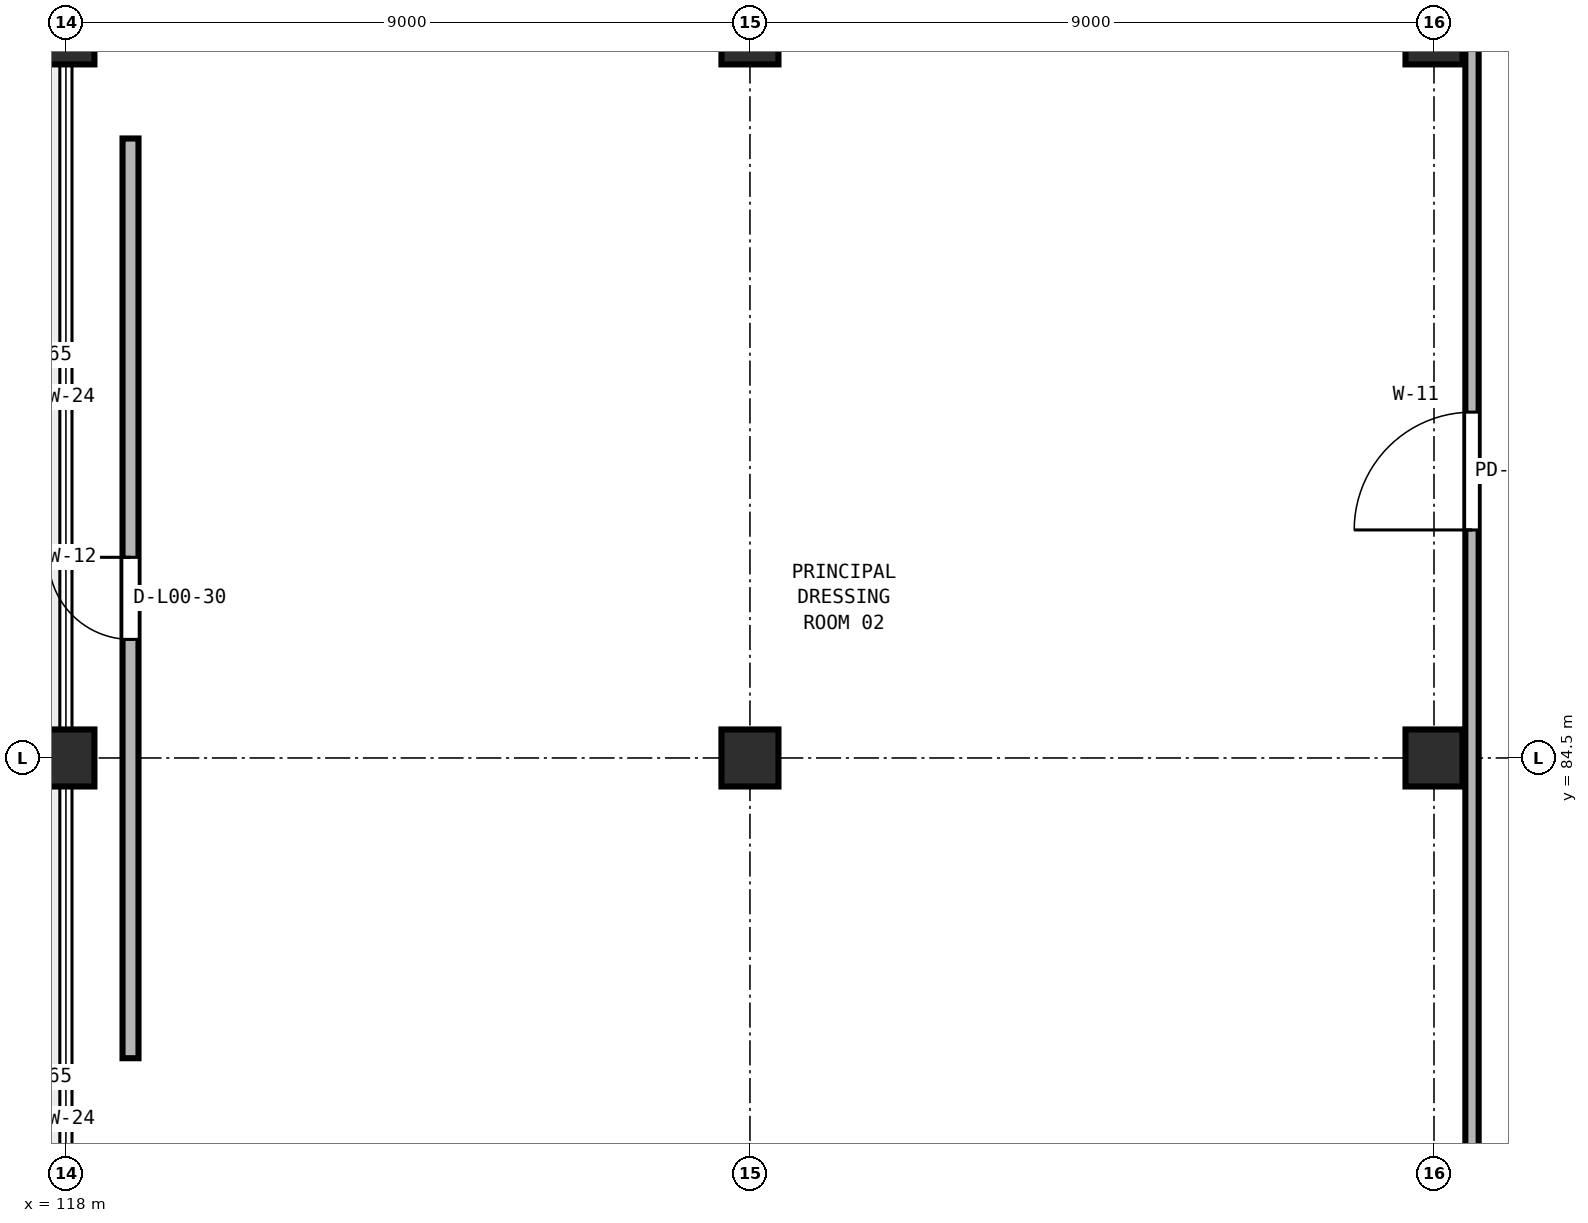
"""IFC4 building model, lengths in metres.
Left out: names, types, materials, properties, quantities, classifications, styles, units other than length and angle.
Written with IfcOpenShell. Run it as: python <this file> out.ifc"""

import sys

from ifc_helpers import new_model, si_unit, direction, frame, frame_2d, origin, origin_2d, place, context, subcontext, project, spatial, rectangle, extrude, element, fill, save


model = new_model("IFC4")
c1 = context("Model", 3, precision=1e-05, world=origin(), true_north=direction((0.0, 1.0)))
c2 = subcontext(c1, "Body", "Model", "MODEL_VIEW")
j1 = project(units=[si_unit("LENGTHUNIT", "METRE"), si_unit("PLANEANGLEUNIT", "RADIAN")], contexts=[c1])
p1 = place(None, origin())
s1 = spatial("IfcSite", under=j1, at=p1, CompositionType="ELEMENT")
p2 = place(p1, origin())
s2 = spatial("IfcBuilding", under=s1, at=p2, CompositionType="ELEMENT")
p3 = place(p2, origin())
s3 = spatial("IfcBuildingStorey", under=s2, at=p3, CompositionType="ELEMENT", Elevation=0.0)
for number, where, z_axis, x_axis in (
    (1, (118.0, 84.5, 0.0), (0.0, 0.0, 1.0), (1.0, 0.0, 0.0)),
    (2, (118.0, 94.0, 0.0), (0.0, 0.0, 1.0), (1.0, 0.0, 0.0)),
    (3, (127.0, 84.5, 0.0), (0.0, 0.0, 1.0), (1.0, 0.0, 0.0)),
    (4, (127.0, 94.0, 0.0), (0.0, 0.0, 1.0), (1.0, 0.0, 0.0)),
    (5, (136.0, 84.5, 0.0), (0.0, 0.0, 1.0), (1.0, 0.0, 0.0)),
    (6, (136.0, 94.0, 0.0), (0.0, 0.0, 1.0), (1.0, 0.0, 0.0)),
):
    element("IfcColumn", number, at=place(p3, frame(where, z_axis=z_axis, x_axis=x_axis)), inside=s3, PredefinedType="COLUMN", context=c2, shape_type="SweptSolid", body=[
        extrude(rectangle(XDim=0.75, YDim=0.75, at=origin_2d()), origin(), (0.0, 0.0, 1.0), 5.12),
    ])
p4 = place(p3, frame((118.85, 80.55, 0.0), z_axis=(0.0, 0.0, 1.0), x_axis=(0.0, 1.0, 0.0)))
e7 = element("IfcWall", 7, at=p4, inside=s3, PredefinedType="PARTITIONING", context=c2, shape_type="SweptSolid", body=[
    extrude(rectangle(XDim=12.1, YDim=0.21, at=frame_2d((6.05, 0.0))), origin(), (0.0, 0.0, 1.0), 5.07),
])
p5 = place(p4, frame((5.51, 0.0, 0.0)))
e8 = element("IfcOpeningElement", 8, at=p5, cuts=e7, PredefinedType="OPENING", context=c2, shape_type="SweptSolid", body=[
    extrude(rectangle(XDim=1.08, YDim=2.18, at=frame_2d((0.54, 1.09))), frame((0.0, 0.115, 0.0), z_axis=(0.0, -1.0, 0.0), x_axis=(1.0, 0.0, 0.0)), (0.0, 0.0, 1.0), 0.23),
])
p6 = place(p3, frame((136.5, 67.0, 0.0), z_axis=(0.0, 0.0, 1.0), x_axis=(0.0, 1.0, 0.0)))
e9 = element("IfcWall", 9, at=p6, inside=s3, PredefinedType="PARTITIONING", context=c2, shape_type="SweptSolid", body=[
    extrude(rectangle(XDim=36.5, YDim=0.175, at=frame_2d((18.25, 0.0))), origin(), (0.0, 0.0, 1.0), 5.08),
])
p7 = place(p6, frame((20.5, 0.0, 0.0)))
e10 = element("IfcOpeningElement", 10, at=p7, cuts=e9, PredefinedType="OPENING", context=c2, shape_type="SweptSolid", body=[
    extrude(rectangle(XDim=1.55, YDim=2.22, at=frame_2d((0.775, 1.11))), frame((0.0, 0.097, 0.0), z_axis=(0.0, -1.0, 0.0), x_axis=(1.0, 0.0, 0.0)), (0.0, 0.0, 1.0), 0.195),
])
p8 = place(p5, origin())
e11 = element("IfcDoor", 11, at=p8, inside=s3, OperationType="SINGLE_SWING_RIGHT", PredefinedType="DOOR", context=c2, shape_type="SweptSolid", body=[
    extrude(rectangle(XDim=1.08, YDim=2.18, at=frame_2d((0.54, 1.09))), frame((0.0, 0.025, 0.0), z_axis=(0.0, -1.0, 0.0), x_axis=(1.0, 0.0, 0.0)), (0.0, 0.0, 1.0), 0.05),
])
fill(e8, e11)
p9 = place(p7, origin())
e12 = element("IfcDoor", 12, at=p9, inside=s3, OperationType="SINGLE_SWING_LEFT", PredefinedType="DOOR", context=c2, shape_type="SweptSolid", body=[
    extrude(rectangle(XDim=1.55, YDim=2.22, at=frame_2d((0.775, 1.11))), frame((0.0, 0.025, 0.0), z_axis=(0.0, -1.0, 0.0), x_axis=(1.0, 0.0, 0.0)), (0.0, 0.0, 1.0), 0.05),
])
fill(e10, e12)
save(model, sys.argv[1])
